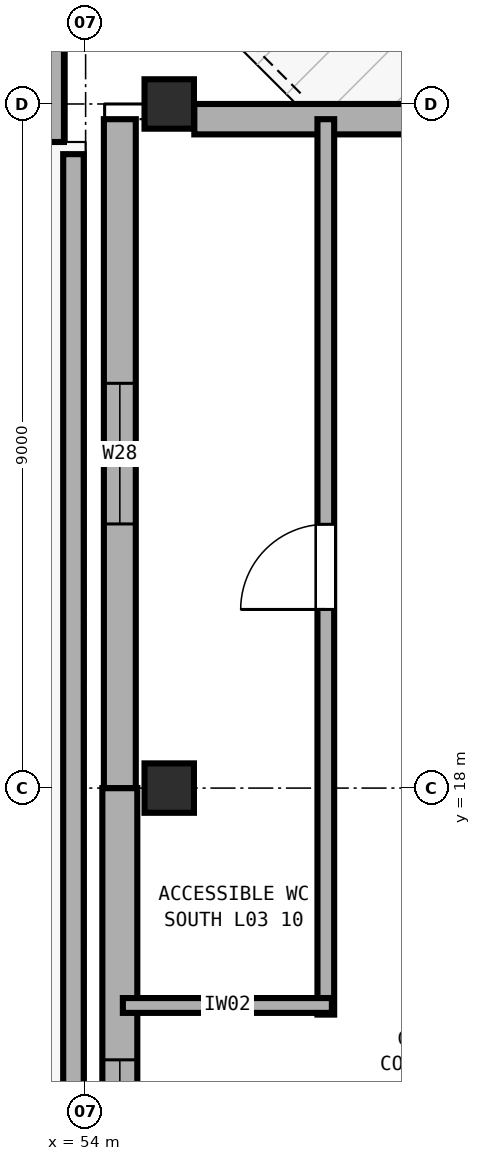
"""IFC4 building model, lengths in metres.
Left out: names, types, materials, properties, quantities, classifications, styles, units other than length and angle.
Written with IfcOpenShell. Run it as: python <this file> out.ifc"""

import sys

from ifc_helpers import new_model, si_unit, direction, frame, frame_2d, origin, origin_2d, place, context, subcontext, project, spatial, rectangle, extrude, element, fill, save


model = new_model("IFC4")
c1 = context("Model", 3, precision=1e-05, world=origin(), true_north=direction((0.0, 1.0)))
c2 = subcontext(c1, "Body", "Model", "MODEL_VIEW")
j1 = project(units=[si_unit("LENGTHUNIT", "METRE"), si_unit("PLANEANGLEUNIT", "RADIAN")], contexts=[c1])
p1 = place(None, origin())
s1 = spatial("IfcSite", under=j1, at=p1, CompositionType="ELEMENT")
p2 = place(p1, origin())
s2 = spatial("IfcBuilding", under=s1, at=p2, CompositionType="ELEMENT")
p3 = place(p2, frame((0.0, 0.0, 14.4)))
s3 = spatial("IfcBuildingStorey", under=s2, at=p3, CompositionType="ELEMENT", Elevation=14.4)
for number, where, z_axis, x_axis in (
    (1, (55.1, 18.0, 0.0), (0.0, 0.0, 1.0), (1.0, 0.0, 0.0)),
    (2, (55.1, 27.0, 0.0), (0.0, 0.0, 1.0), (1.0, 0.0, 0.0)),
):
    element("IfcColumn", number, at=place(p3, frame(where, z_axis=z_axis, x_axis=x_axis)), inside=s3, PredefinedType="COLUMN", context=c2, shape_type="SweptSolid", body=[
        extrude(rectangle(XDim=0.65, YDim=0.65, at=origin_2d()), origin(), (0.0, 0.0, 1.0), 4.8),
    ])
p4 = place(p3, frame((54.45, 9.2, 0.0), z_axis=(0.0, 0.0, 1.0), x_axis=(0.0, 1.0, 0.0)))
e3 = element("IfcWall", 3, at=p4, inside=s3, PredefinedType="SOLIDWALL", context=c2, shape_type="SweptSolid", body=[
    extrude(rectangle(XDim=8.8, YDim=0.46, at=frame_2d((4.4, 0.0))), origin(), (0.0, 0.0, 1.0), 3.58),
])
p5 = place(p4, frame((3.575, 0.0, 0.9)))
e4 = element("IfcOpeningElement", 4, at=p5, cuts=e3, PredefinedType="OPENING", context=c2, shape_type="SweptSolid", body=[
    extrude(rectangle(XDim=1.65, YDim=1.9, at=frame_2d((0.825, 0.95))), frame((0.0, 0.24, 0.0), z_axis=(0.0, -1.0, 0.0), x_axis=(1.0, 0.0, 0.0)), (0.0, 0.0, 1.0), 0.48),
])
p6 = place(p3, frame((54.45, 18.0, 0.0), z_axis=(0.0, 0.0, 1.0), x_axis=(0.0, 1.0, 0.0)))
e5 = element("IfcWall", 5, at=p6, inside=s3, PredefinedType="SOLIDWALL", context=c2, shape_type="SweptSolid", body=[
    extrude(rectangle(XDim=8.8, YDim=0.42, at=frame_2d((4.4, 0.0))), origin(), (0.0, 0.0, 1.0), 3.58),
])
p7 = place(p6, frame((3.475, 0.0, 0.9)))
e6 = element("IfcOpeningElement", 6, at=p7, cuts=e5, PredefinedType="OPENING", context=c2, shape_type="SweptSolid", body=[
    extrude(rectangle(XDim=1.85, YDim=1.95, at=frame_2d((0.925, 0.975))), frame((0.0, 0.22, 0.0), z_axis=(0.0, -1.0, 0.0), x_axis=(1.0, 0.0, 0.0)), (0.0, 0.0, 1.0), 0.44),
])
p8 = place(p3, frame((55.43, 26.8, 0.0), z_axis=(0.0, 0.0, 1.0), x_axis=(1.0, 0.0, 0.0)))
e7 = element("IfcWall", 7, at=p8, inside=s3, PredefinedType="SOLIDWALL", context=c2, shape_type="SweptSolid", body=[
    extrude(rectangle(XDim=7.24, YDim=0.4, at=frame_2d((3.62, 0.0))), origin(), (0.0, 0.0, 1.0), 3.58),
])
p9 = place(p8, frame((2.895, 0.0, 0.0)))
e8 = element("IfcOpeningElement", 8, at=p9, cuts=e7, PredefinedType="OPENING", context=c2, shape_type="SweptSolid", body=[
    extrude(rectangle(XDim=1.45, YDim=2.15, at=frame_2d((0.725, 1.075))), frame((0.0, 0.21, 0.0), z_axis=(0.0, -1.0, 0.0), x_axis=(1.0, 0.0, 0.0)), (0.0, 0.0, 1.0), 0.42),
])
p10 = place(p3, frame((53.59, 35.84, 0.0), z_axis=(0.0, 0.0, 1.0), x_axis=(0.0, -1.0, 0.0)))
e9 = element("IfcWall", 9, at=p10, inside=s3, PredefinedType="PARAPET", context=c2, shape_type="SweptSolid", body=[
    extrude(rectangle(XDim=9.34, YDim=0.25, at=frame_2d((4.67, 0.0))), origin(), (0.0, 0.0, 1.0), 0.65),
])
p11 = place(p3, frame((53.84, 26.34, 0.0), z_axis=(0.0, 0.0, 1.0), x_axis=(0.0, -1.0, 0.0)))
e10 = element("IfcWall", 10, at=p11, inside=s3, PredefinedType="PARAPET", context=c2, shape_type="SweptSolid", body=[
    extrude(rectangle(XDim=17.18, YDim=0.27, at=frame_2d((8.59, 0.0))), origin(), (0.0, 0.0, 1.0), 0.65),
])
p12 = place(p3, frame((57.16, 15.02, 0.0), z_axis=(0.0, 0.0, 1.0), x_axis=(0.0, 1.0, 0.0)))
e11 = element("IfcWall", 11, at=p12, inside=s3, PredefinedType="PARTITIONING", context=c2, shape_type="SweptSolid", body=[
    extrude(rectangle(XDim=11.78, YDim=0.22, at=frame_2d((5.89, 0.0))), origin(), (0.0, 0.0, 1.0), 3.56),
])
p13 = place(p12, frame((5.33, 0.0, 0.0)))
e12 = element("IfcOpeningElement", 12, at=p13, cuts=e11, PredefinedType="OPENING", context=c2, shape_type="SweptSolid", body=[
    extrude(rectangle(XDim=1.12, YDim=2.22, at=frame_2d((0.56, 1.11))), frame((0.0, 0.12, 0.0), z_axis=(0.0, -1.0, 0.0), x_axis=(1.0, 0.0, 0.0)), (0.0, 0.0, 1.0), 0.24),
])
p14 = place(p3, frame((57.24, 15.14, 0.0), z_axis=(0.0, 0.0, 1.0), x_axis=(-1.0, 0.0, 0.0)))
e13 = element("IfcWall", 13, at=p14, inside=s3, PredefinedType="PARTITIONING", context=c2, shape_type="SweptSolid", body=[
    extrude(rectangle(XDim=2.75, YDim=0.195, at=frame_2d((1.375, 0.0))), origin(), (0.0, 0.0, 1.0), 3.56),
])
p15 = place(p5, origin())
e14 = element("IfcWindow", 14, at=p15, inside=s3, PartitioningType="SINGLE_PANEL", PredefinedType="WINDOW", context=c2, shape_type="SweptSolid", body=[
    extrude(rectangle(XDim=1.65, YDim=1.9, at=frame_2d((0.825, 0.95))), frame((0.0, 0.03, 0.0), z_axis=(0.0, -1.0, 0.0), x_axis=(1.0, 0.0, 0.0)), (0.0, 0.0, 1.0), 0.06),
])
fill(e4, e14)
p16 = place(p7, origin())
e15 = element("IfcWindow", 15, at=p16, inside=s3, PartitioningType="DOUBLE_PANEL_VERTICAL", PredefinedType="WINDOW", context=c2, shape_type="SweptSolid", body=[
    extrude(rectangle(XDim=1.85, YDim=1.95, at=frame_2d((0.925, 0.975))), frame((0.0, 0.03, 0.0), z_axis=(0.0, -1.0, 0.0), x_axis=(1.0, 0.0, 0.0)), (0.0, 0.0, 1.0), 0.06),
])
fill(e6, e15)
p17 = place(p13, origin())
e16 = element("IfcDoor", 16, at=p17, inside=s3, OperationType="SINGLE_SWING_LEFT", PredefinedType="DOOR", context=c2, shape_type="SweptSolid", body=[
    extrude(rectangle(XDim=1.12, YDim=2.22, at=frame_2d((0.56, 1.11))), frame((0.0, 0.025, 0.0), z_axis=(0.0, -1.0, 0.0), x_axis=(1.0, 0.0, 0.0)), (0.0, 0.0, 1.0), 0.05),
])
fill(e12, e16)
save(model, sys.argv[1])
